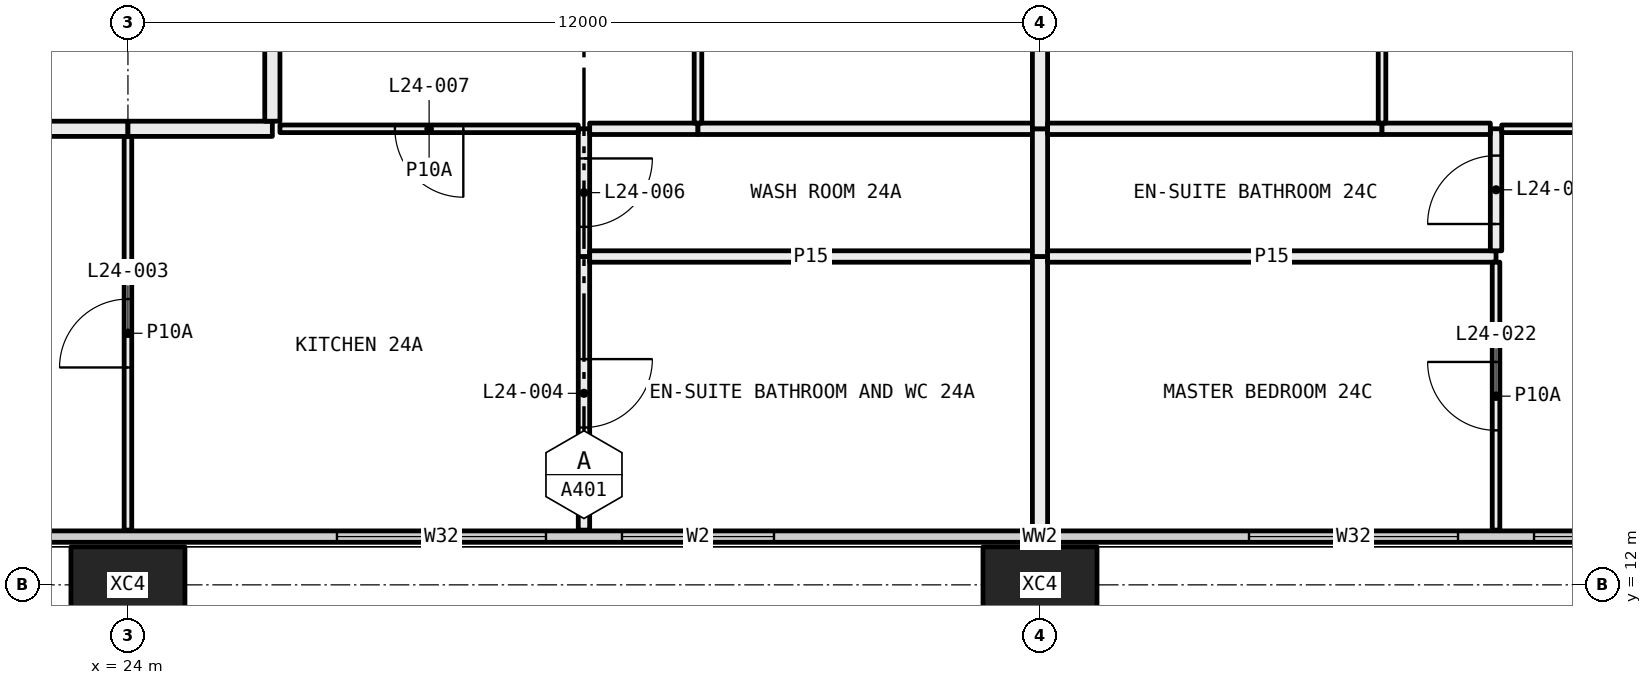
"""IFC4 building model, lengths in metres.
Left out: names, types, materials, properties, quantities, classifications, styles, units other than length and angle.
Written with IfcOpenShell. Run it as: python <this file> out.ifc"""

import sys

from ifc_helpers import new_model, si_unit, direction, frame, frame_2d, origin, origin_2d, place, context, subcontext, project, spatial, rectangle, hollow_rectangle, extrude, element, fill, save


model = new_model("IFC4")
c1 = context("Model", 3, precision=1e-05, world=origin(), true_north=direction((0.0, 1.0)))
c2 = subcontext(c1, "Body", "Model", "MODEL_VIEW")
j1 = project(units=[si_unit("LENGTHUNIT", "METRE"), si_unit("PLANEANGLEUNIT", "RADIAN")], contexts=[c1])
p1 = place(None, origin())
s1 = spatial("IfcSite", under=j1, at=p1, CompositionType="ELEMENT")
p2 = place(p1, origin())
s2 = spatial("IfcBuilding", under=s1, at=p2, CompositionType="ELEMENT")
p3 = place(p2, frame((0.0, 0.0, 96.6)))
s3 = spatial("IfcBuildingStorey", under=s2, at=p3, CompositionType="ELEMENT", Elevation=96.6)
for number, where, z_axis, x_axis in (
    (1, (24.0, 12.0, -0.4), (0.0, 0.0, 1.0), (1.0, 0.0, 0.0)),
    (2, (36.0, 12.0, -0.4), (0.0, 0.0, 1.0), (1.0, 0.0, 0.0)),
):
    element("IfcColumn", number, at=place(p3, frame(where, z_axis=z_axis, x_axis=x_axis)), inside=s3, PredefinedType="COLUMN", context=c2, shape_type="SweptSolid", body=[
        extrude(hollow_rectangle(XDim=1.5, YDim=1.0, WallThickness=0.06, at=origin_2d()), origin(), (0.0, 0.0, 1.0), 3.45),
    ])
p4 = place(p3, frame((6.56, 12.635, 0.0), z_axis=(0.0, 0.0, 1.0), x_axis=(1.0, 0.0, 0.0)))
e3 = element("IfcWall", 3, at=p4, inside=s3, PredefinedType="ELEMENTEDWALL", context=c2, shape_type="SweptSolid", body=[
    extrude(rectangle(XDim=58.88, YDim=0.15, at=frame_2d((29.44, 0.0))), origin(), (0.0, 0.0, 1.0), 3.05),
])
p5 = place(p4, frame((0.44, 0.0, 0.45)))
e4 = element("IfcOpeningElement", 4, at=p5, cuts=e3, PredefinedType="OPENING", context=c2, shape_type="SweptSolid", body=[
    extrude(rectangle(XDim=4.5, YDim=2.55, at=frame_2d((2.25, 1.275))), frame((0.0, 0.085, 0.0), z_axis=(0.0, -1.0, 0.0), x_axis=(1.0, 0.0, 0.0)), (0.0, 0.0, 1.0), 0.17),
])
p6 = place(p4, frame((8.19, 0.0, 0.45)))
e5 = element("IfcOpeningElement", 5, at=p6, cuts=e3, PredefinedType="OPENING", context=c2, shape_type="SweptSolid", body=[
    extrude(rectangle(XDim=2.75, YDim=2.55, at=frame_2d((1.375, 1.275))), frame((0.0, 0.085, 0.0), z_axis=(0.0, -1.0, 0.0), x_axis=(1.0, 0.0, 0.0)), (0.0, 0.0, 1.0), 0.17),
])
p7 = place(p4, frame((11.94, 0.0, 0.45)))
e6 = element("IfcOpeningElement", 6, at=p7, cuts=e3, PredefinedType="OPENING", context=c2, shape_type="SweptSolid", body=[
    extrude(rectangle(XDim=2.75, YDim=2.55, at=frame_2d((1.375, 1.275))), frame((0.0, 0.085, 0.0), z_axis=(0.0, -1.0, 0.0), x_axis=(1.0, 0.0, 0.0)), (0.0, 0.0, 1.0), 0.17),
])
p8 = place(p4, frame((20.19, 0.0, 0.45)))
e7 = element("IfcOpeningElement", 7, at=p8, cuts=e3, PredefinedType="OPENING", context=c2, shape_type="SweptSolid", body=[
    extrude(rectangle(XDim=2.75, YDim=2.55, at=frame_2d((1.375, 1.275))), frame((0.0, 0.085, 0.0), z_axis=(0.0, -1.0, 0.0), x_axis=(1.0, 0.0, 0.0)), (0.0, 0.0, 1.0), 0.17),
])
p9 = place(p4, frame((23.94, 0.0, 0.45)))
e8 = element("IfcOpeningElement", 8, at=p9, cuts=e3, PredefinedType="OPENING", context=c2, shape_type="SweptSolid", body=[
    extrude(rectangle(XDim=2.0, YDim=2.55, at=frame_2d((1.0, 1.275))), frame((0.0, 0.085, 0.0), z_axis=(0.0, -1.0, 0.0), x_axis=(1.0, 0.0, 0.0)), (0.0, 0.0, 1.0), 0.17),
])
p10 = place(p4, frame((32.19, 0.0, 0.45)))
e9 = element("IfcOpeningElement", 9, at=p10, cuts=e3, PredefinedType="OPENING", context=c2, shape_type="SweptSolid", body=[
    extrude(rectangle(XDim=2.75, YDim=2.55, at=frame_2d((1.375, 1.275))), frame((0.0, 0.085, 0.0), z_axis=(0.0, -1.0, 0.0), x_axis=(1.0, 0.0, 0.0)), (0.0, 0.0, 1.0), 0.17),
])
p11 = place(p4, frame((35.94, 0.0, 0.45)))
e10 = element("IfcOpeningElement", 10, at=p11, cuts=e3, PredefinedType="OPENING", context=c2, shape_type="SweptSolid", body=[
    extrude(rectangle(XDim=2.75, YDim=2.55, at=frame_2d((1.375, 1.275))), frame((0.0, 0.085, 0.0), z_axis=(0.0, -1.0, 0.0), x_axis=(1.0, 0.0, 0.0)), (0.0, 0.0, 1.0), 0.17),
])
p12 = place(p4, frame((44.19, 0.0, 0.45)))
e11 = element("IfcOpeningElement", 11, at=p12, cuts=e3, PredefinedType="OPENING", context=c2, shape_type="SweptSolid", body=[
    extrude(rectangle(XDim=2.75, YDim=2.55, at=frame_2d((1.375, 1.275))), frame((0.0, 0.085, 0.0), z_axis=(0.0, -1.0, 0.0), x_axis=(1.0, 0.0, 0.0)), (0.0, 0.0, 1.0), 0.17),
])
p13 = place(p4, frame((47.94, 0.0, 0.45)))
e12 = element("IfcOpeningElement", 12, at=p13, cuts=e3, PredefinedType="OPENING", context=c2, shape_type="SweptSolid", body=[
    extrude(rectangle(XDim=2.0, YDim=2.55, at=frame_2d((1.0, 1.275))), frame((0.0, 0.085, 0.0), z_axis=(0.0, -1.0, 0.0), x_axis=(1.0, 0.0, 0.0)), (0.0, 0.0, 1.0), 0.17),
])
p14 = place(p4, frame((53.94, 0.0, 0.45)))
e13 = element("IfcOpeningElement", 13, at=p14, cuts=e3, PredefinedType="OPENING", context=c2, shape_type="SweptSolid", body=[
    extrude(rectangle(XDim=4.5, YDim=2.55, at=frame_2d((2.25, 1.275))), frame((0.0, 0.085, 0.0), z_axis=(0.0, -1.0, 0.0), x_axis=(1.0, 0.0, 0.0)), (0.0, 0.0, 1.0), 0.17),
])
p15 = place(p3, frame((24.0, 12.72, 0.0), z_axis=(0.0, 0.0, 1.0), x_axis=(0.0, 1.0, 0.0)))
e14 = element("IfcWall", 14, at=p15, inside=s3, PredefinedType="PARTITIONING", context=c2, shape_type="SweptSolid", body=[
    extrude(rectangle(XDim=5.18, YDim=0.1, at=frame_2d((2.59, 0.0))), origin(), (0.0, 0.0, 1.0), 3.05),
])
p16 = place(p15, frame((2.14, 0.0, 0.0)))
e15 = element("IfcOpeningElement", 15, at=p16, cuts=e14, PredefinedType="OPENING", context=c2, shape_type="SweptSolid", body=[
    extrude(rectangle(XDim=0.9, YDim=2.1, at=frame_2d((0.45, 1.05))), frame((0.0, 0.06, 0.0), z_axis=(0.0, -1.0, 0.0), x_axis=(1.0, 0.0, 0.0)), (0.0, 0.0, 1.0), 0.12),
])
p17 = place(p3, frame((24.0, 18.0, 0.0), z_axis=(0.0, 0.0, 1.0), x_axis=(-1.0, 0.0, 0.0)))
e16 = element("IfcWall", 16, at=p17, inside=s3, PredefinedType="PARTITIONING", context=c2, shape_type="SweptSolid", body=[
    extrude(rectangle(XDim=6.0, YDim=0.2, at=frame_2d((3.0, 0.0))), origin(), (0.0, 0.0, 1.0), 3.05),
])
p18 = place(p3, frame((30.0, 12.72, 0.0), z_axis=(0.0, 0.0, 1.0), x_axis=(0.0, 1.0, 0.0)))
e17 = element("IfcWall", 17, at=p18, inside=s3, PredefinedType="PARTITIONING", context=c2, shape_type="SweptSolid", body=[
    extrude(rectangle(XDim=3.6, YDim=0.15, at=frame_2d((1.8, 0.0))), origin(), (0.0, 0.0, 1.0), 3.05),
])
p19 = place(p18, frame((1.35, 0.0, 0.0)))
e18 = element("IfcOpeningElement", 18, at=p19, cuts=e17, PredefinedType="OPENING", context=c2, shape_type="SweptSolid", body=[
    extrude(rectangle(XDim=0.9, YDim=2.1, at=frame_2d((0.45, 1.05))), frame((0.0, 0.085, 0.0), z_axis=(0.0, -1.0, 0.0), x_axis=(1.0, 0.0, 0.0)), (0.0, 0.0, 1.0), 0.17),
])
p20 = place(p3, frame((30.0, 16.32, 0.0), z_axis=(0.0, 0.0, 1.0), x_axis=(0.0, 1.0, 0.0)))
e19 = element("IfcWall", 19, at=p20, inside=s3, PredefinedType="PARTITIONING", context=c2, shape_type="SweptSolid", body=[
    extrude(rectangle(XDim=1.68, YDim=0.15, at=frame_2d((0.84, 0.0))), origin(), (0.0, 0.0, 1.0), 3.05),
])
p21 = place(p20, frame((0.39, 0.0, 0.0)))
e20 = element("IfcOpeningElement", 20, at=p21, cuts=e19, PredefinedType="OPENING", context=c2, shape_type="SweptSolid", body=[
    extrude(rectangle(XDim=0.9, YDim=2.1, at=frame_2d((0.45, 1.05))), frame((0.0, 0.085, 0.0), z_axis=(0.0, -1.0, 0.0), x_axis=(1.0, 0.0, 0.0)), (0.0, 0.0, 1.0), 0.17),
])
p22 = place(p3, frame((29.925, 18.0, 0.0), z_axis=(0.0, 0.0, 1.0), x_axis=(-1.0, 0.0, 0.0)))
e21 = element("IfcWall", 21, at=p22, inside=s3, PredefinedType="PARTITIONING", context=c2, shape_type="SweptSolid", body=[
    extrude(rectangle(XDim=3.925, YDim=0.1, at=frame_2d((1.962, 0.0))), origin(), (0.0, 0.0, 1.0), 3.05),
])
p23 = place(p22, frame((1.512, 0.0, 0.0)))
e22 = element("IfcOpeningElement", 22, at=p23, cuts=e21, PredefinedType="OPENING", context=c2, shape_type="SweptSolid", body=[
    extrude(rectangle(XDim=0.9, YDim=2.1, at=frame_2d((0.45, 1.05))), frame((0.0, 0.06, 0.0), z_axis=(0.0, -1.0, 0.0), x_axis=(1.0, 0.0, 0.0)), (0.0, 0.0, 1.0), 0.12),
])
p24 = place(p3, frame((25.9, 18.0, 0.0), z_axis=(0.0, 0.0, 1.0), x_axis=(-1.0, 0.0, 0.0)))
e23 = element("IfcWall", 23, at=p24, inside=s3, PredefinedType="PARTITIONING", context=c2, shape_type="SweptSolid", body=[
    extrude(rectangle(XDim=1.9, YDim=0.2, at=frame_2d((0.95, 0.0))), origin(), (0.0, 0.0, 1.0), 3.05),
])
p25 = place(p3, frame((35.9, 16.32, 0.0), z_axis=(0.0, 0.0, 1.0), x_axis=(-1.0, 0.0, 0.0)))
e24 = element("IfcWall", 24, at=p25, inside=s3, PredefinedType="PARTITIONING", context=c2, shape_type="SweptSolid", body=[
    extrude(rectangle(XDim=5.825, YDim=0.15, at=frame_2d((2.913, 0.0))), origin(), (0.0, 0.0, 1.0), 3.05),
])
p26 = place(p3, frame((36.0, 12.72, 0.0), z_axis=(0.0, 0.0, 1.0), x_axis=(0.0, 1.0, 0.0)))
e25 = element("IfcWall", 25, at=p26, inside=s3, PredefinedType="PARTITIONING", context=c2, shape_type="SweptSolid", body=[
    extrude(rectangle(XDim=3.6, YDim=0.2, at=frame_2d((1.8, 0.0))), origin(), (0.0, 0.0, 1.0), 2.45),
])
p27 = place(p3, frame((31.5, 18.0, 0.0), z_axis=(0.0, 0.0, 1.0), x_axis=(-1.0, 0.0, 0.0)))
e26 = element("IfcWall", 26, at=p27, inside=s3, PredefinedType="PARTITIONING", context=c2, shape_type="SweptSolid", body=[
    extrude(rectangle(XDim=1.425, YDim=0.15, at=frame_2d((0.712, 0.0))), origin(), (0.0, 0.0, 1.0), 3.05),
])
p28 = place(p3, frame((35.9, 18.0, 0.0), z_axis=(0.0, 0.0, 1.0), x_axis=(-1.0, 0.0, 0.0)))
e27 = element("IfcWall", 27, at=p28, inside=s3, PredefinedType="PARTITIONING", context=c2, shape_type="SweptSolid", body=[
    extrude(rectangle(XDim=4.4, YDim=0.15, at=frame_2d((2.2, 0.0))), origin(), (0.0, 0.0, 1.0), 3.05),
])
p29 = place(p3, frame((36.0, 16.32, 0.0), z_axis=(0.0, 0.0, 1.0), x_axis=(0.0, 1.0, 0.0)))
e28 = element("IfcWall", 28, at=p29, inside=s3, PredefinedType="PARTITIONING", context=c2, shape_type="SweptSolid", body=[
    extrude(rectangle(XDim=1.68, YDim=0.2, at=frame_2d((0.84, 0.0))), origin(), (0.0, 0.0, 1.0), 2.45),
])
p30 = place(p3, frame((31.5, 18.075, 0.0), z_axis=(0.0, 0.0, 1.0), x_axis=(0.0, 1.0, 0.0)))
e29 = element("IfcWall", 29, at=p30, inside=s3, PredefinedType="PARTITIONING", context=c2, shape_type="SweptSolid", body=[
    extrude(rectangle(XDim=6.225, YDim=0.1, at=frame_2d((3.113, 0.0))), origin(), (0.0, 0.0, 1.0), 2.45),
])
p31 = place(p30, frame((2.663, 0.0, 0.0)))
e30 = element("IfcOpeningElement", 30, at=p31, cuts=e29, PredefinedType="OPENING", context=c2, shape_type="SweptSolid", body=[
    extrude(rectangle(XDim=0.9, YDim=2.1, at=frame_2d((0.45, 1.05))), frame((0.0, 0.06, 0.0), z_axis=(0.0, -1.0, 0.0), x_axis=(1.0, 0.0, 0.0)), (0.0, 0.0, 1.0), 0.12),
])
p32 = place(p3, frame((25.9, 23.9, 0.0), z_axis=(0.0, 0.0, 1.0), x_axis=(0.0, -1.0, 0.0)))
e31 = element("IfcWall", 31, at=p32, inside=s3, PredefinedType="PARTITIONING", context=c2, shape_type="SweptSolid", body=[
    extrude(rectangle(XDim=5.8, YDim=0.2, at=frame_2d((2.9, 0.0))), origin(), (0.0, 0.0, 1.0), 3.05),
])
p33 = place(p3, frame((36.0, 18.0, 0.0), z_axis=(0.0, 0.0, 1.0), x_axis=(0.0, 1.0, 0.0)))
e32 = element("IfcWall", 32, at=p33, inside=s3, PredefinedType="PARTITIONING", context=c2, shape_type="SweptSolid", body=[
    extrude(rectangle(XDim=5.25, YDim=0.2, at=frame_2d((2.625, 0.0))), origin(), (0.0, 0.0, 1.0), 2.45),
])
p34 = place(p3, frame((42.0, 16.32, 0.0), z_axis=(0.0, 0.0, 1.0), x_axis=(-1.0, 0.0, 0.0)))
e33 = element("IfcWall", 33, at=p34, inside=s3, PredefinedType="PARTITIONING", context=c2, shape_type="SweptSolid", body=[
    extrude(rectangle(XDim=5.9, YDim=0.15, at=frame_2d((2.95, 0.0))), origin(), (0.0, 0.0, 1.0), 3.05),
])
p35 = place(p3, frame((42.0, 12.72, 0.0), z_axis=(0.0, 0.0, 1.0), x_axis=(0.0, 1.0, 0.0)))
e34 = element("IfcWall", 34, at=p35, inside=s3, PredefinedType="PARTITIONING", context=c2, shape_type="SweptSolid", body=[
    extrude(rectangle(XDim=3.525, YDim=0.1, at=frame_2d((1.763, 0.0))), origin(), (0.0, 0.0, 1.0), 3.05),
])
p36 = place(p35, frame((1.312, 0.0, 0.0)))
e35 = element("IfcOpeningElement", 35, at=p36, cuts=e34, PredefinedType="OPENING", context=c2, shape_type="SweptSolid", body=[
    extrude(rectangle(XDim=0.9, YDim=2.1, at=frame_2d((0.45, 1.05))), frame((0.0, 0.06, 0.0), z_axis=(0.0, -1.0, 0.0), x_axis=(1.0, 0.0, 0.0)), (0.0, 0.0, 1.0), 0.12),
])
p37 = place(p3, frame((42.0, 16.395, 0.0), z_axis=(0.0, 0.0, 1.0), x_axis=(0.0, 1.0, 0.0)))
e36 = element("IfcWall", 36, at=p37, inside=s3, PredefinedType="PARTITIONING", context=c2, shape_type="SweptSolid", body=[
    extrude(rectangle(XDim=1.605, YDim=0.15, at=frame_2d((0.802, 0.0))), origin(), (0.0, 0.0, 1.0), 3.05),
])
p38 = place(p37, frame((0.353, 0.0, 0.0)))
e37 = element("IfcOpeningElement", 37, at=p38, cuts=e36, PredefinedType="OPENING", context=c2, shape_type="SweptSolid", body=[
    extrude(rectangle(XDim=0.9, YDim=2.1, at=frame_2d((0.45, 1.05))), frame((0.0, 0.085, 0.0), z_axis=(0.0, -1.0, 0.0), x_axis=(1.0, 0.0, 0.0)), (0.0, 0.0, 1.0), 0.17),
])
p39 = place(p3, frame((40.5, 18.0, 0.0), z_axis=(0.0, 0.0, 1.0), x_axis=(-1.0, 0.0, 0.0)))
e38 = element("IfcWall", 38, at=p39, inside=s3, PredefinedType="PARTITIONING", context=c2, shape_type="SweptSolid", body=[
    extrude(rectangle(XDim=4.4, YDim=0.15, at=frame_2d((2.2, 0.0))), origin(), (0.0, 0.0, 1.0), 3.05),
])
p40 = place(p3, frame((41.925, 18.0, 0.0), z_axis=(0.0, 0.0, 1.0), x_axis=(-1.0, 0.0, 0.0)))
e39 = element("IfcWall", 39, at=p40, inside=s3, PredefinedType="PARTITIONING", context=c2, shape_type="SweptSolid", body=[
    extrude(rectangle(XDim=1.425, YDim=0.15, at=frame_2d((0.712, 0.0))), origin(), (0.0, 0.0, 1.0), 3.05),
])
p41 = place(p3, frame((46.0, 18.0, 0.0), z_axis=(0.0, 0.0, 1.0), x_axis=(-1.0, 0.0, 0.0)))
e40 = element("IfcWall", 40, at=p41, inside=s3, PredefinedType="PARTITIONING", context=c2, shape_type="SweptSolid", body=[
    extrude(rectangle(XDim=3.925, YDim=0.1, at=frame_2d((1.962, 0.0))), origin(), (0.0, 0.0, 1.0), 3.05),
])
p42 = place(p41, frame((1.512, 0.0, 0.0)))
e41 = element("IfcOpeningElement", 41, at=p42, cuts=e40, PredefinedType="OPENING", context=c2, shape_type="SweptSolid", body=[
    extrude(rectangle(XDim=0.9, YDim=2.1, at=frame_2d((0.45, 1.05))), frame((0.0, 0.06, 0.0), z_axis=(0.0, -1.0, 0.0), x_axis=(1.0, 0.0, 0.0)), (0.0, 0.0, 1.0), 0.12),
])
p43 = place(p3, frame((40.5, 18.075, 0.0), z_axis=(0.0, 0.0, 1.0), x_axis=(0.0, 1.0, 0.0)))
e42 = element("IfcWall", 42, at=p43, inside=s3, PredefinedType="PARTITIONING", context=c2, shape_type="SweptSolid", body=[
    extrude(rectangle(XDim=6.15, YDim=0.1, at=frame_2d((3.075, 0.0))), origin(), (0.0, 0.0, 1.0), 2.45),
])
p44 = place(p43, frame((2.625, 0.0, 0.0)))
e43 = element("IfcOpeningElement", 43, at=p44, cuts=e42, PredefinedType="OPENING", context=c2, shape_type="SweptSolid", body=[
    extrude(rectangle(XDim=0.9, YDim=2.1, at=frame_2d((0.45, 1.05))), frame((0.0, 0.06, 0.0), z_axis=(0.0, -1.0, 0.0), x_axis=(1.0, 0.0, 0.0)), (0.0, 0.0, 1.0), 0.12),
])
p45 = place(p8, origin())
e44 = element("IfcWindow", 44, at=p45, inside=s3, PartitioningType="SINGLE_PANEL", PredefinedType="WINDOW", context=c2, shape_type="SweptSolid", body=[
    extrude(rectangle(XDim=2.75, YDim=2.55, at=frame_2d((1.375, 1.275))), frame((0.0, 0.03, 0.0), z_axis=(0.0, -1.0, 0.0), x_axis=(1.0, 0.0, 0.0)), (0.0, 0.0, 1.0), 0.06),
])
fill(e7, e44)
p46 = place(p9, origin())
e45 = element("IfcWindow", 45, at=p46, inside=s3, PartitioningType="SINGLE_PANEL", PredefinedType="WINDOW", context=c2, shape_type="SweptSolid", body=[
    extrude(rectangle(XDim=2.0, YDim=2.55, at=frame_2d((1.0, 1.275))), frame((0.0, 0.03, 0.0), z_axis=(0.0, -1.0, 0.0), x_axis=(1.0, 0.0, 0.0)), (0.0, 0.0, 1.0), 0.06),
])
fill(e8, e45)
p47 = place(p10, origin())
e46 = element("IfcWindow", 46, at=p47, inside=s3, PartitioningType="SINGLE_PANEL", PredefinedType="WINDOW", context=c2, shape_type="SweptSolid", body=[
    extrude(rectangle(XDim=2.75, YDim=2.55, at=frame_2d((1.375, 1.275))), frame((0.0, 0.03, 0.0), z_axis=(0.0, -1.0, 0.0), x_axis=(1.0, 0.0, 0.0)), (0.0, 0.0, 1.0), 0.06),
])
fill(e9, e46)
p48 = place(p11, origin())
e47 = element("IfcWindow", 47, at=p48, inside=s3, PartitioningType="SINGLE_PANEL", PredefinedType="WINDOW", context=c2, shape_type="SweptSolid", body=[
    extrude(rectangle(XDim=2.75, YDim=2.55, at=frame_2d((1.375, 1.275))), frame((0.0, 0.03, 0.0), z_axis=(0.0, -1.0, 0.0), x_axis=(1.0, 0.0, 0.0)), (0.0, 0.0, 1.0), 0.06),
])
fill(e10, e47)
p49 = place(p16, origin())
e48 = element("IfcDoor", 48, at=p49, inside=s3, OperationType="SINGLE_SWING_RIGHT", PredefinedType="DOOR", context=c2, shape_type="SweptSolid", body=[
    extrude(rectangle(XDim=0.9, YDim=2.1, at=frame_2d((0.45, 1.05))), frame((0.0, 0.025, 0.0), z_axis=(0.0, -1.0, 0.0), x_axis=(1.0, 0.0, 0.0)), (0.0, 0.0, 1.0), 0.05),
])
fill(e15, e48)
p50 = place(p19, frame((0.9, 0.0, 0.0), x_axis=(-1.0, 0.0, 0.0)))
e49 = element("IfcDoor", 49, at=p50, inside=s3, OperationType="SINGLE_SWING_RIGHT", PredefinedType="DOOR", context=c2, shape_type="SweptSolid", body=[
    extrude(rectangle(XDim=0.9, YDim=2.1, at=frame_2d((0.45, 1.05))), frame((0.0, 0.025, 0.0), z_axis=(0.0, -1.0, 0.0), x_axis=(1.0, 0.0, 0.0)), (0.0, 0.0, 1.0), 0.05),
])
fill(e18, e49)
p51 = place(p21, frame((0.9, 0.0, 0.0), x_axis=(-1.0, 0.0, 0.0)))
e50 = element("IfcDoor", 50, at=p51, inside=s3, OperationType="SINGLE_SWING_RIGHT", PredefinedType="DOOR", context=c2, shape_type="SweptSolid", body=[
    extrude(rectangle(XDim=0.9, YDim=2.1, at=frame_2d((0.45, 1.05))), frame((0.0, 0.025, 0.0), z_axis=(0.0, -1.0, 0.0), x_axis=(1.0, 0.0, 0.0)), (0.0, 0.0, 1.0), 0.05),
])
fill(e20, e50)
p52 = place(p23, origin())
e51 = element("IfcDoor", 51, at=p52, inside=s3, OperationType="SINGLE_SWING_RIGHT", PredefinedType="DOOR", context=c2, shape_type="SweptSolid", body=[
    extrude(rectangle(XDim=0.9, YDim=2.1, at=frame_2d((0.45, 1.05))), frame((0.0, 0.025, 0.0), z_axis=(0.0, -1.0, 0.0), x_axis=(1.0, 0.0, 0.0)), (0.0, 0.0, 1.0), 0.05),
])
fill(e22, e51)
p53 = place(p38, origin())
e52 = element("IfcDoor", 52, at=p53, inside=s3, OperationType="SINGLE_SWING_RIGHT", PredefinedType="DOOR", context=c2, shape_type="SweptSolid", body=[
    extrude(rectangle(XDim=0.9, YDim=2.1, at=frame_2d((0.45, 1.05))), frame((0.0, 0.025, 0.0), z_axis=(0.0, -1.0, 0.0), x_axis=(1.0, 0.0, 0.0)), (0.0, 0.0, 1.0), 0.05),
])
fill(e37, e52)
p54 = place(p36, origin())
e53 = element("IfcDoor", 53, at=p54, inside=s3, OperationType="SINGLE_SWING_LEFT", PredefinedType="DOOR", context=c2, shape_type="SweptSolid", body=[
    extrude(rectangle(XDim=0.9, YDim=2.1, at=frame_2d((0.45, 1.05))), frame((0.0, 0.025, 0.0), z_axis=(0.0, -1.0, 0.0), x_axis=(1.0, 0.0, 0.0)), (0.0, 0.0, 1.0), 0.05),
])
fill(e35, e53)
save(model, sys.argv[1])
